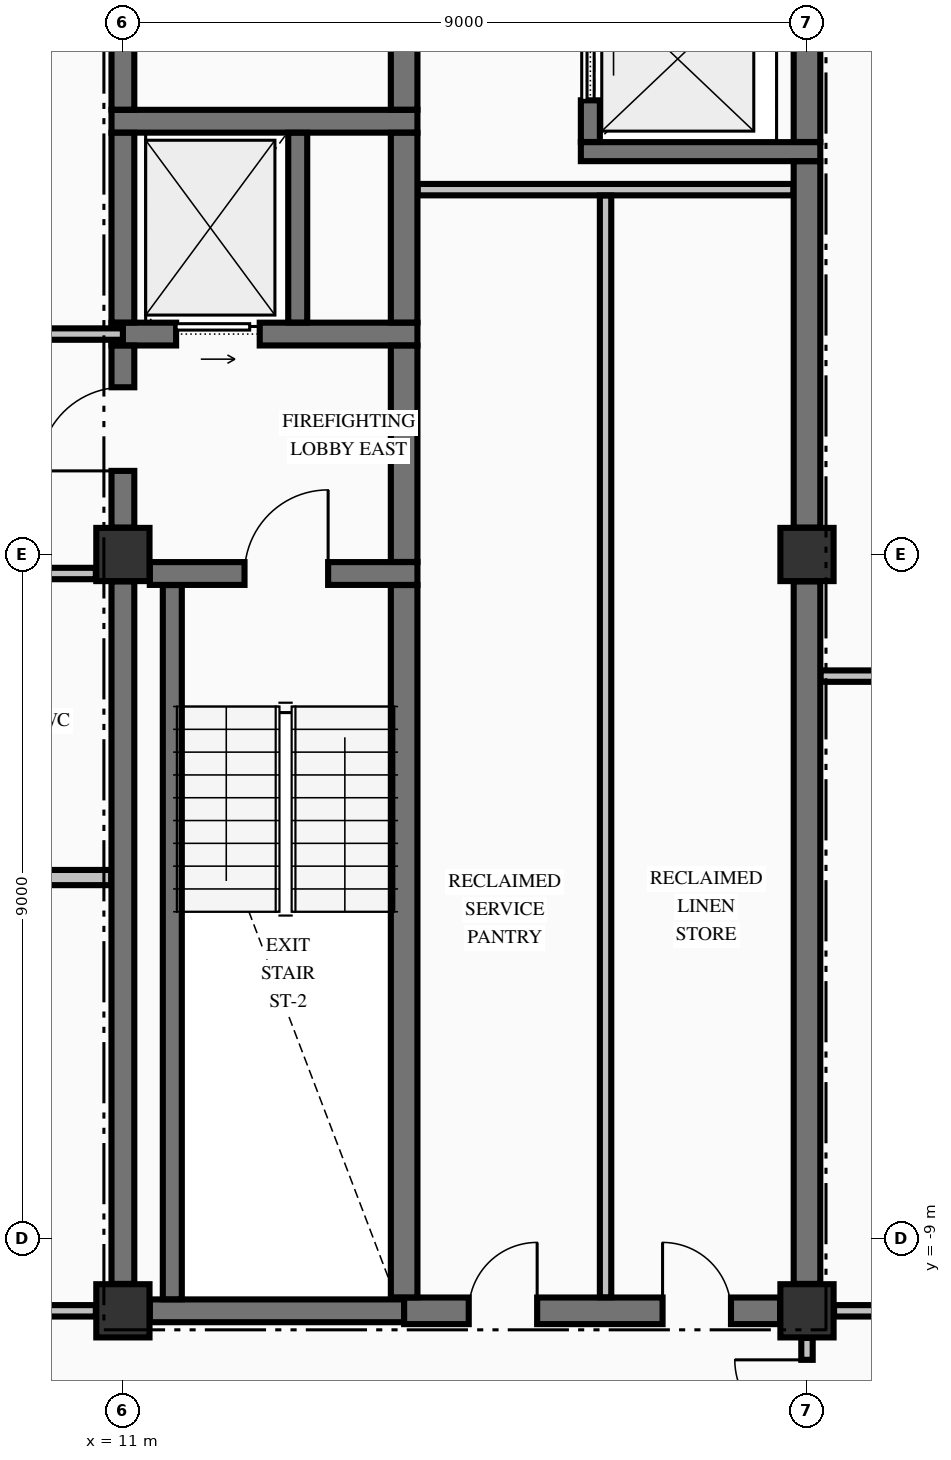
"""IFC4 building model, lengths in metres.
Left out: names, types, materials, properties, quantities, classifications, styles, units other than length and angle.
Written with IfcOpenShell. Run it as: python <this file> out.ifc"""

import sys

from ifc_helpers import new_model, si_unit, direction, frame, frame_2d, origin, origin_2d, place, context, subcontext, project, spatial, rectangle, extrude, element, fill, save


model = new_model("IFC4")
c1 = context("Model", 3, precision=1e-05, world=origin(), true_north=direction((0.0, 1.0)))
c2 = subcontext(c1, "Body", "Model", "MODEL_VIEW")
j1 = project(units=[si_unit("LENGTHUNIT", "METRE"), si_unit("PLANEANGLEUNIT", "RADIAN")], contexts=[c1])
p1 = place(None, origin())
s1 = spatial("IfcSite", under=j1, at=p1, CompositionType="ELEMENT")
p2 = place(p1, origin())
s2 = spatial("IfcBuilding", under=s1, at=p2, CompositionType="ELEMENT")
p3 = place(p2, frame((0.0, 0.0, 239.74)))
s3 = spatial("IfcBuildingStorey", under=s2, at=p3, CompositionType="ELEMENT", Elevation=239.74)
for number, where, z_axis, x_axis in (
    (1, (11.0, -9.95, -0.25), (0.0, 0.0, 1.0), (1.0, 0.0, 0.0)),
    (2, (11.0, 0.0, -0.25), (0.0, 0.0, 1.0), (1.0, 0.0, 0.0)),
    (3, (20.0, -9.95, -0.25), (0.0, 0.0, 1.0), (1.0, 0.0, 0.0)),
    (4, (20.0, 0.0, -0.25), (0.0, 0.0, 1.0), (1.0, 0.0, 0.0)),
):
    element("IfcColumn", number, at=place(p3, frame(where, z_axis=z_axis, x_axis=x_axis)), inside=s3, PredefinedType="COLUMN", context=c2, shape_type="SweptSolid", body=[
        extrude(rectangle(XDim=0.7, YDim=0.7, at=origin_2d()), origin(), (0.0, 0.0, 1.0), 3.23),
    ])
p4 = place(p3, frame((11.354, -9.95, 0.0), z_axis=(0.0, 0.0, 1.0), x_axis=(1.0, 0.0, 0.0)))
e5 = element("IfcWall", 5, at=p4, inside=s3, PredefinedType="SHEAR", context=c2, shape_type="SweptSolid", body=[
    extrude(rectangle(XDim=3.346, YDim=0.3, at=frame_2d((1.673, 0.0))), origin(), (0.0, 0.0, 1.0), 2.98),
])
p5 = place(p3, frame((14.7, -9.95, 0.0), z_axis=(0.0, 0.0, 1.0), x_axis=(1.0, 0.0, 0.0)))
e6 = element("IfcWall", 6, at=p5, inside=s3, PredefinedType="SHEAR", context=c2, shape_type="SweptSolid", body=[
    extrude(rectangle(XDim=4.946, YDim=0.35, at=frame_2d((2.473, 0.0))), origin(), (0.0, 0.0, 1.0), 2.98),
])
p6 = place(p5, frame((0.85, 0.0, 0.0)))
e7 = element("IfcOpeningElement", 7, at=p6, cuts=e6, PredefinedType="OPENING", context=c2, shape_type="SweptSolid", body=[
    extrude(rectangle(XDim=0.9, YDim=2.15, at=frame_2d((0.45, 1.075))), frame((0.0, 0.185, 0.0), z_axis=(0.0, -1.0, 0.0), x_axis=(1.0, 0.0, 0.0)), (0.0, 0.0, 1.0), 0.37),
])
p7 = place(p5, frame((3.4, 0.0, 0.0)))
e8 = element("IfcOpeningElement", 8, at=p7, cuts=e6, PredefinedType="OPENING", context=c2, shape_type="SweptSolid", body=[
    extrude(rectangle(XDim=0.9, YDim=2.15, at=frame_2d((0.45, 1.075))), frame((0.0, 0.185, 0.0), z_axis=(0.0, -1.0, 0.0), x_axis=(1.0, 0.0, 0.0)), (0.0, 0.0, 1.0), 0.37),
])
p8 = place(p3, frame((11.354, -0.25, 0.0), z_axis=(0.0, 0.0, 1.0), x_axis=(1.0, 0.0, 0.0)))
e9 = element("IfcWall", 9, at=p8, inside=s3, PredefinedType="SHEAR", context=c2, shape_type="SweptSolid", body=[
    extrude(rectangle(XDim=3.521, YDim=0.3, at=frame_2d((1.76, 0.0))), origin(), (0.0, 0.0, 1.0), 2.98),
])
p9 = place(p8, frame((1.246, 0.0, 0.0)))
e10 = element("IfcOpeningElement", 10, at=p9, cuts=e9, PredefinedType="OPENING", context=c2, shape_type="SweptSolid", body=[
    extrude(rectangle(XDim=1.1, YDim=2.15, at=frame_2d((0.55, 1.075))), frame((0.0, 0.16, 0.0), z_axis=(0.0, -1.0, 0.0), x_axis=(1.0, 0.0, 0.0)), (0.0, 0.0, 1.0), 0.32),
])
p10 = place(p3, frame((10.85, 2.9, 0.0), z_axis=(0.0, 0.0, 1.0), x_axis=(1.0, 0.0, 0.0)))
e11 = element("IfcWall", 11, at=p10, inside=s3, PredefinedType="SHEAR", context=c2, shape_type="SweptSolid", body=[
    extrude(rectangle(XDim=4.025, YDim=0.3, at=frame_2d((2.012, 0.0))), origin(), (0.0, 0.0, 1.0), 2.98),
])
p11 = place(p10, frame((0.85, 0.0, 0.0)))
e12 = element("IfcOpeningElement", 12, at=p11, cuts=e11, PredefinedType="OPENING", context=c2, shape_type="SweptSolid", body=[
    extrude(rectangle(XDim=1.1, YDim=2.2, at=frame_2d((0.55, 1.1))), frame((0.0, 0.16, 0.0), z_axis=(0.0, -1.0, 0.0), x_axis=(1.0, 0.0, 0.0)), (0.0, 0.0, 1.0), 0.32),
])
p12 = place(p3, frame((17.025, 5.3, 0.0), z_axis=(0.0, 0.0, 1.0), x_axis=(1.0, 0.0, 0.0)))
e13 = element("IfcWall", 13, at=p12, inside=s3, PredefinedType="SOLIDWALL", context=c2, shape_type="SweptSolid", body=[
    extrude(rectangle(XDim=3.15, YDim=0.25, at=frame_2d((1.575, 0.0))), origin(), (0.0, 0.0, 1.0), 2.98),
])
p13 = place(p3, frame((10.85, 5.7, 0.0), z_axis=(0.0, 0.0, 1.0), x_axis=(1.0, 0.0, 0.0)))
e14 = element("IfcWall", 14, at=p13, inside=s3, PredefinedType="SHEAR", context=c2, shape_type="SweptSolid", body=[
    extrude(rectangle(XDim=4.025, YDim=0.3, at=frame_2d((2.012, 0.0))), origin(), (0.0, 0.0, 1.0), 2.98),
])
p14 = place(p3, frame((-10.644, -9.95, 0.0), z_axis=(0.0, 0.0, 1.0), x_axis=(1.0, 0.0, 0.0)))
e15 = element("IfcWall", 15, at=p14, inside=s3, PredefinedType="PARTITIONING", context=c2, shape_type="SweptSolid", body=[
    extrude(rectangle(XDim=21.288, YDim=0.15, at=frame_2d((10.644, 0.0))), origin(), (0.0, 0.0, 1.0), 2.98),
])
p15 = place(p14, frame((8.294, 0.0, 0.0)))
e16 = element("IfcOpeningElement", 16, at=p15, cuts=e15, PredefinedType="OPENING", context=c2, shape_type="SweptSolid", body=[
    extrude(rectangle(XDim=1.1, YDim=2.15, at=frame_2d((0.55, 1.075))), frame((0.0, 0.085, 0.0), z_axis=(0.0, -1.0, 0.0), x_axis=(1.0, 0.0, 0.0)), (0.0, 0.0, 1.0), 0.17),
])
p16 = place(p14, frame((13.769, 0.0, 0.0)))
e17 = element("IfcOpeningElement", 17, at=p16, cuts=e15, PredefinedType="OPENING", context=c2, shape_type="SweptSolid", body=[
    extrude(rectangle(XDim=0.95, YDim=2.15, at=frame_2d((0.475, 1.075))), frame((0.0, 0.085, 0.0), z_axis=(0.0, -1.0, 0.0), x_axis=(1.0, 0.0, 0.0)), (0.0, 0.0, 1.0), 0.17),
])
p17 = place(p14, frame((17.994, 0.0, 0.0)))
e18 = element("IfcOpeningElement", 18, at=p17, cuts=e15, PredefinedType="OPENING", context=c2, shape_type="SweptSolid", body=[
    extrude(rectangle(XDim=0.9, YDim=2.15, at=frame_2d((0.45, 1.075))), frame((0.0, 0.085, 0.0), z_axis=(0.0, -1.0, 0.0), x_axis=(1.0, 0.0, 0.0)), (0.0, 0.0, 1.0), 0.17),
])
p18 = place(p3, frame((20.356, -9.95, 0.0), z_axis=(0.0, 0.0, 1.0), x_axis=(1.0, 0.0, 0.0)))
e19 = element("IfcWall", 19, at=p18, inside=s3, PredefinedType="PARTITIONING", context=c2, shape_type="SweptSolid", body=[
    extrude(rectangle(XDim=5.479, YDim=0.15, at=frame_2d((2.74, 0.0))), origin(), (0.0, 0.0, 1.0), 2.98),
])
p19 = place(p18, frame((2.169, 0.0, 0.0)))
e20 = element("IfcOpeningElement", 20, at=p19, cuts=e19, PredefinedType="OPENING", context=c2, shape_type="SweptSolid", body=[
    extrude(rectangle(XDim=0.95, YDim=2.15, at=frame_2d((0.475, 1.075))), frame((0.0, 0.085, 0.0), z_axis=(0.0, -1.0, 0.0), x_axis=(1.0, 0.0, 0.0)), (0.0, 0.0, 1.0), 0.17),
])
p20 = place(p3, frame((-0.775, -4.25, 0.0), z_axis=(0.0, 0.0, 1.0), x_axis=(1.0, 0.0, 0.0)))
e21 = element("IfcWall", 21, at=p20, inside=s3, PredefinedType="PARTITIONING", context=c2, shape_type="SweptSolid", body=[
    extrude(rectangle(XDim=11.622, YDim=0.2, at=frame_2d((5.811, 0.0))), origin(), (0.0, 0.0, 1.0), 2.98),
])
p21 = place(p3, frame((20.178, -1.6, 0.0), z_axis=(0.0, 0.0, 1.0), x_axis=(1.0, 0.0, 0.0)))
e22 = element("IfcWall", 22, at=p21, inside=s3, PredefinedType="PARTITIONING", context=c2, shape_type="SweptSolid", body=[
    extrude(rectangle(XDim=5.657, YDim=0.15, at=frame_2d((2.829, 0.0))), origin(), (0.0, 0.0, 1.0), 2.98),
])
p22 = place(p3, frame((-10.644, -0.25, 0.0), z_axis=(0.0, 0.0, 1.0), x_axis=(1.0, 0.0, 0.0)))
e23 = element("IfcWall", 23, at=p22, inside=s3, PredefinedType="PARTITIONING", context=c2, shape_type="SweptSolid", body=[
    extrude(rectangle(XDim=21.288, YDim=0.15, at=frame_2d((10.644, 0.0))), origin(), (0.0, 0.0, 1.0), 2.98),
])
p23 = place(p22, frame((8.294, 0.0, 0.0)))
e24 = element("IfcOpeningElement", 24, at=p23, cuts=e23, PredefinedType="OPENING", context=c2, shape_type="SweptSolid", body=[
    extrude(rectangle(XDim=1.1, YDim=2.15, at=frame_2d((0.55, 1.075))), frame((0.0, 0.085, 0.0), z_axis=(0.0, -1.0, 0.0), x_axis=(1.0, 0.0, 0.0)), (0.0, 0.0, 1.0), 0.17),
])
p24 = place(p22, frame((3.169, 0.0, 0.0)))
e25 = element("IfcOpeningElement", 25, at=p24, cuts=e23, PredefinedType="OPENING", context=c2, shape_type="SweptSolid", body=[
    extrude(rectangle(XDim=1.05, YDim=2.15, at=frame_2d((0.525, 1.075))), frame((0.0, 0.085, 0.0), z_axis=(0.0, -1.0, 0.0), x_axis=(1.0, 0.0, 0.0)), (0.0, 0.0, 1.0), 0.17),
])
p25 = place(p22, frame((15.319, 0.0, 0.0)))
e26 = element("IfcOpeningElement", 26, at=p25, cuts=e23, PredefinedType="OPENING", context=c2, shape_type="SweptSolid", body=[
    extrude(rectangle(XDim=0.95, YDim=2.15, at=frame_2d((0.475, 1.075))), frame((0.0, 0.085, 0.0), z_axis=(0.0, -1.0, 0.0), x_axis=(1.0, 0.0, 0.0)), (0.0, 0.0, 1.0), 0.17),
])
p26 = place(p3, frame((-11.0, 2.9, 0.0), z_axis=(0.0, 0.0, 1.0), x_axis=(1.0, 0.0, 0.0)))
e27 = element("IfcWall", 27, at=p26, inside=s3, PredefinedType="PARTITIONING", context=c2, shape_type="SweptSolid", body=[
    extrude(rectangle(XDim=22.0, YDim=0.15, at=frame_2d((11.0, 0.0))), origin(), (0.0, 0.0, 1.0), 2.98),
])
p27 = place(p26, frame((8.65, 0.0, 0.0)))
e28 = element("IfcOpeningElement", 28, at=p27, cuts=e27, PredefinedType="OPENING", context=c2, shape_type="SweptSolid", body=[
    extrude(rectangle(XDim=1.1, YDim=2.15, at=frame_2d((0.55, 1.075))), frame((0.0, 0.085, 0.0), z_axis=(0.0, -1.0, 0.0), x_axis=(1.0, 0.0, 0.0)), (0.0, 0.0, 1.0), 0.17),
])
p28 = place(p26, frame((3.525, 0.0, 0.0)))
e29 = element("IfcOpeningElement", 29, at=p28, cuts=e27, PredefinedType="OPENING", context=c2, shape_type="SweptSolid", body=[
    extrude(rectangle(XDim=1.05, YDim=2.15, at=frame_2d((0.525, 1.075))), frame((0.0, 0.085, 0.0), z_axis=(0.0, -1.0, 0.0), x_axis=(1.0, 0.0, 0.0)), (0.0, 0.0, 1.0), 0.17),
])
p29 = place(p26, frame((12.225, 0.0, 0.0)))
e30 = element("IfcOpeningElement", 30, at=p29, cuts=e27, PredefinedType="OPENING", context=c2, shape_type="SweptSolid", body=[
    extrude(rectangle(XDim=0.95, YDim=2.15, at=frame_2d((0.475, 1.075))), frame((0.0, 0.085, 0.0), z_axis=(0.0, -1.0, 0.0), x_axis=(1.0, 0.0, 0.0)), (0.0, 0.0, 1.0), 0.17),
])
p30 = place(p26, frame((18.075, 0.0, 0.0)))
e31 = element("IfcOpeningElement", 31, at=p30, cuts=e27, PredefinedType="OPENING", context=c2, shape_type="SweptSolid", body=[
    extrude(rectangle(XDim=0.95, YDim=2.15, at=frame_2d((0.475, 1.075))), frame((0.0, 0.085, 0.0), z_axis=(0.0, -1.0, 0.0), x_axis=(1.0, 0.0, 0.0)), (0.0, 0.0, 1.0), 0.17),
])
p31 = place(p3, frame((14.878, 4.8, 0.0), z_axis=(0.0, 0.0, 1.0), x_axis=(1.0, 0.0, 0.0)))
e32 = element("IfcWall", 32, at=p31, inside=s3, PredefinedType="PARTITIONING", context=c2, shape_type="SweptSolid", body=[
    extrude(rectangle(XDim=4.944, YDim=0.15, at=frame_2d((2.472, 0.0))), origin(), (0.0, 0.0, 1.0), 2.98),
])
p32 = place(p3, frame((11.0, -9.596, 0.0), z_axis=(0.0, 0.0, 1.0), x_axis=(0.0, 1.0, 0.0)))
e33 = element("IfcWall", 33, at=p32, inside=s3, PredefinedType="SHEAR", context=c2, shape_type="SweptSolid", body=[
    extrude(rectangle(XDim=9.242, YDim=0.3, at=frame_2d((4.621, 0.0))), origin(), (0.0, 0.0, 1.0), 2.98),
])
p33 = place(p3, frame((11.0, 0.354, 0.0), z_axis=(0.0, 0.0, 1.0), x_axis=(0.0, 1.0, 0.0)))
e34 = element("IfcWall", 34, at=p33, inside=s3, PredefinedType="SHEAR", context=c2, shape_type="SweptSolid", body=[
    extrude(rectangle(XDim=2.394, YDim=0.3, at=frame_2d((1.197, 0.0))), origin(), (0.0, 0.0, 1.0), 2.98),
])
p34 = place(p33, frame((0.746, 0.0, 0.0)))
e35 = element("IfcOpeningElement", 35, at=p34, cuts=e34, PredefinedType="OPENING", context=c2, shape_type="SweptSolid", body=[
    extrude(rectangle(XDim=1.1, YDim=2.15, at=frame_2d((0.55, 1.075))), frame((0.0, 0.16, 0.0), z_axis=(0.0, -1.0, 0.0), x_axis=(1.0, 0.0, 0.0)), (0.0, 0.0, 1.0), 0.32),
])
p35 = place(p3, frame((11.0, 3.052, 0.0), z_axis=(0.0, 0.0, 1.0), x_axis=(0.0, 1.0, 0.0)))
e36 = element("IfcWall", 36, at=p35, inside=s3, PredefinedType="SHEAR", context=c2, shape_type="SweptSolid", body=[
    extrude(rectangle(XDim=2.496, YDim=0.3, at=frame_2d((1.248, 0.0))), origin(), (0.0, 0.0, 1.0), 2.98),
])
p36 = place(p3, frame((11.0, 5.852, 0.0), z_axis=(0.0, 0.0, 1.0), x_axis=(0.0, 1.0, 0.0)))
e37 = element("IfcWall", 37, at=p36, inside=s3, PredefinedType="SHEAR", context=c2, shape_type="SweptSolid", body=[
    extrude(rectangle(XDim=4.294, YDim=0.3, at=frame_2d((2.147, 0.0))), origin(), (0.0, 0.0, 1.0), 2.98),
])
p37 = place(p3, frame((11.65, -9.798, 0.0), z_axis=(0.0, 0.0, 1.0), x_axis=(0.0, 1.0, 0.0)))
e38 = element("IfcWall", 38, at=p37, inside=s3, PredefinedType="SOLIDWALL", context=c2, shape_type="SweptSolid", body=[
    extrude(rectangle(XDim=9.396, YDim=0.25, at=frame_2d((4.698, 0.0))), origin(), (0.0, 0.0, 1.0), 2.98),
])
p38 = place(p3, frame((13.3, 3.052, 0.0), z_axis=(0.0, 0.0, 1.0), x_axis=(0.0, 1.0, 0.0)))
e39 = element("IfcWall", 39, at=p38, inside=s3, PredefinedType="SOLIDWALL", context=c2, shape_type="SweptSolid", body=[
    extrude(rectangle(XDim=2.496, YDim=0.25, at=frame_2d((1.248, 0.0))), origin(), (0.0, 0.0, 1.0), 2.98),
])
p39 = place(p3, frame((14.7, -9.773, 0.0), z_axis=(0.0, 0.0, 1.0), x_axis=(0.0, 1.0, 0.0)))
e40 = element("IfcWall", 40, at=p39, inside=s3, PredefinedType="SHEAR", context=c2, shape_type="SweptSolid", body=[
    extrude(rectangle(XDim=9.371, YDim=0.35, at=frame_2d((4.686, 0.0))), origin(), (0.0, 0.0, 1.0), 2.98),
])
p40 = place(p3, frame((14.7, -0.098, 0.0), z_axis=(0.0, 0.0, 1.0), x_axis=(0.0, 1.0, 0.0)))
e41 = element("IfcWall", 41, at=p40, inside=s3, PredefinedType="SHEAR", context=c2, shape_type="SweptSolid", body=[
    extrude(rectangle(XDim=2.846, YDim=0.35, at=frame_2d((1.423, 0.0))), origin(), (0.0, 0.0, 1.0), 2.98),
])
p41 = place(p3, frame((14.7, 3.052, 0.0), z_axis=(0.0, 0.0, 1.0), x_axis=(0.0, 1.0, 0.0)))
e42 = element("IfcWall", 42, at=p41, inside=s3, PredefinedType="SHEAR", context=c2, shape_type="SweptSolid", body=[
    extrude(rectangle(XDim=2.496, YDim=0.35, at=frame_2d((1.248, 0.0))), origin(), (0.0, 0.0, 1.0), 2.98),
])
p42 = place(p3, frame((14.7, 5.852, 0.0), z_axis=(0.0, 0.0, 1.0), x_axis=(0.0, 1.0, 0.0)))
e43 = element("IfcWall", 43, at=p42, inside=s3, PredefinedType="SHEAR", context=c2, shape_type="SweptSolid", body=[
    extrude(rectangle(XDim=4.471, YDim=0.35, at=frame_2d((2.235, 0.0))), origin(), (0.0, 0.0, 1.0), 2.98),
])
p43 = place(p3, frame((17.15, 5.427, 0.0), z_axis=(0.0, 0.0, 1.0), x_axis=(0.0, 1.0, 0.0)))
e44 = element("IfcWall", 44, at=p43, inside=s3, PredefinedType="SOLIDWALL", context=c2, shape_type="SweptSolid", body=[
    extrude(rectangle(XDim=2.196, YDim=0.25, at=frame_2d((1.098, 0.0))), origin(), (0.0, 0.0, 1.0), 2.98),
])
p44 = place(p43, frame((0.548, 0.0, 0.0)))
e45 = element("IfcOpeningElement", 45, at=p44, cuts=e44, PredefinedType="OPENING", context=c2, shape_type="SweptSolid", body=[
    extrude(rectangle(XDim=1.1, YDim=2.2, at=frame_2d((0.55, 1.1))), frame((0.0, 0.135, 0.0), z_axis=(0.0, -1.0, 0.0), x_axis=(1.0, 0.0, 0.0)), (0.0, 0.0, 1.0), 0.27),
])
p45 = place(p3, frame((20.0, -9.596, 0.0), z_axis=(0.0, 0.0, 1.0), x_axis=(0.0, 1.0, 0.0)))
e46 = element("IfcWall", 46, at=p45, inside=s3, PredefinedType="SHEAR", context=c2, shape_type="SweptSolid", body=[
    extrude(rectangle(XDim=9.242, YDim=0.35, at=frame_2d((4.621, 0.0))), origin(), (0.0, 0.0, 1.0), 2.98),
])
p46 = place(p3, frame((20.0, 0.354, 0.0), z_axis=(0.0, 0.0, 1.0), x_axis=(0.0, 1.0, 0.0)))
e47 = element("IfcWall", 47, at=p46, inside=s3, PredefinedType="SHEAR", context=c2, shape_type="SweptSolid", body=[
    extrude(rectangle(XDim=4.819, YDim=0.35, at=frame_2d((2.41, 0.0))), origin(), (0.0, 0.0, 1.0), 2.98),
])
p47 = place(p3, frame((20.0, 5.427, 0.0), z_axis=(0.0, 0.0, 1.0), x_axis=(0.0, 1.0, 0.0)))
e48 = element("IfcWall", 48, at=p47, inside=s3, PredefinedType="SHEAR", context=c2, shape_type="SweptSolid", body=[
    extrude(rectangle(XDim=2.196, YDim=0.35, at=frame_2d((1.098, 0.0))), origin(), (0.0, 0.0, 1.0), 2.98),
])
p48 = place(p3, frame((17.35, -9.772, 0.0), z_axis=(0.0, 0.0, 1.0), x_axis=(0.0, 1.0, 0.0)))
e49 = element("IfcWall", 49, at=p48, inside=s3, PredefinedType="PARTITIONING", context=c2, shape_type="SweptSolid", body=[
    extrude(rectangle(XDim=14.494, YDim=0.15, at=frame_2d((7.247, 0.0))), origin(), (0.0, 0.0, 1.0), 2.98),
])
p49 = place(p3, frame((20.0, -12.122, 0.0), z_axis=(0.0, 0.0, 1.0), x_axis=(0.0, 1.0, 0.0)))
e50 = element("IfcWall", 50, at=p49, inside=s3, PredefinedType="PARTITIONING", context=c2, shape_type="SweptSolid", body=[
    extrude(rectangle(XDim=1.816, YDim=0.15, at=frame_2d((0.908, 0.0))), origin(), (0.0, 0.0, 1.0), 2.98),
])
p50 = place(p49, frame((0.577, 0.0, 0.0)))
e51 = element("IfcOpeningElement", 51, at=p50, cuts=e50, PredefinedType="OPENING", context=c2, shape_type="SweptSolid", body=[
    extrude(rectangle(XDim=0.95, YDim=2.15, at=frame_2d((0.475, 1.075))), frame((0.0, 0.085, 0.0), z_axis=(0.0, -1.0, 0.0), x_axis=(1.0, 0.0, 0.0)), (0.0, 0.0, 1.0), 0.17),
])
p51 = place(p9, origin())
e52 = element("IfcDoor", 52, at=p51, inside=s3, OperationType="SINGLE_SWING_RIGHT", PredefinedType="DOOR", context=c2, shape_type="SweptSolid", body=[
    extrude(rectangle(XDim=1.1, YDim=2.15, at=frame_2d((0.55, 1.075))), frame((0.0, 0.025, 0.0), z_axis=(0.0, -1.0, 0.0), x_axis=(1.0, 0.0, 0.0)), (0.0, 0.0, 1.0), 0.05),
])
fill(e10, e52)
p52 = place(p34, origin())
e53 = element("IfcDoor", 53, at=p52, inside=s3, OperationType="SINGLE_SWING_LEFT", PredefinedType="DOOR", context=c2, shape_type="SweptSolid", body=[
    extrude(rectangle(XDim=1.1, YDim=2.15, at=frame_2d((0.55, 1.075))), frame((0.0, 0.025, 0.0), z_axis=(0.0, -1.0, 0.0), x_axis=(1.0, 0.0, 0.0)), (0.0, 0.0, 1.0), 0.05),
])
fill(e35, e53)
p53 = place(p11, origin())
e54 = element("IfcDoor", 54, at=p53, inside=s3, OperationType="SLIDING_TO_RIGHT", PredefinedType="DOOR", context=c2, shape_type="SweptSolid", body=[
    extrude(rectangle(XDim=1.1, YDim=2.2, at=frame_2d((0.55, 1.1))), frame((0.0, 0.025, 0.0), z_axis=(0.0, -1.0, 0.0), x_axis=(1.0, 0.0, 0.0)), (0.0, 0.0, 1.0), 0.05),
])
fill(e12, e54)
p54 = place(p44, origin())
e55 = element("IfcDoor", 55, at=p54, inside=s3, OperationType="SLIDING_TO_RIGHT", PredefinedType="DOOR", context=c2, shape_type="SweptSolid", body=[
    extrude(rectangle(XDim=1.1, YDim=2.2, at=frame_2d((0.55, 1.1))), frame((0.0, 0.025, 0.0), z_axis=(0.0, -1.0, 0.0), x_axis=(1.0, 0.0, 0.0)), (0.0, 0.0, 1.0), 0.05),
])
fill(e45, e55)
p55 = place(p6, origin())
e56 = element("IfcDoor", 56, at=p55, inside=s3, OperationType="SINGLE_SWING_RIGHT", PredefinedType="DOOR", context=c2, shape_type="SweptSolid", body=[
    extrude(rectangle(XDim=0.9, YDim=2.15, at=frame_2d((0.45, 1.075))), frame((0.0, 0.025, 0.0), z_axis=(0.0, -1.0, 0.0), x_axis=(1.0, 0.0, 0.0)), (0.0, 0.0, 1.0), 0.05),
])
fill(e7, e56)
p56 = place(p7, origin())
e57 = element("IfcDoor", 57, at=p56, inside=s3, OperationType="SINGLE_SWING_LEFT", PredefinedType="DOOR", context=c2, shape_type="SweptSolid", body=[
    extrude(rectangle(XDim=0.9, YDim=2.15, at=frame_2d((0.45, 1.075))), frame((0.0, 0.025, 0.0), z_axis=(0.0, -1.0, 0.0), x_axis=(1.0, 0.0, 0.0)), (0.0, 0.0, 1.0), 0.05),
])
fill(e8, e57)
p57 = place(p50, origin())
e58 = element("IfcDoor", 58, at=p57, inside=s3, OperationType="SINGLE_SWING_RIGHT", PredefinedType="DOOR", context=c2, shape_type="SweptSolid", body=[
    extrude(rectangle(XDim=0.95, YDim=2.15, at=frame_2d((0.475, 1.075))), frame((0.0, 0.025, 0.0), z_axis=(0.0, -1.0, 0.0), x_axis=(1.0, 0.0, 0.0)), (0.0, 0.0, 1.0), 0.05),
])
fill(e51, e58)
save(model, sys.argv[1])
